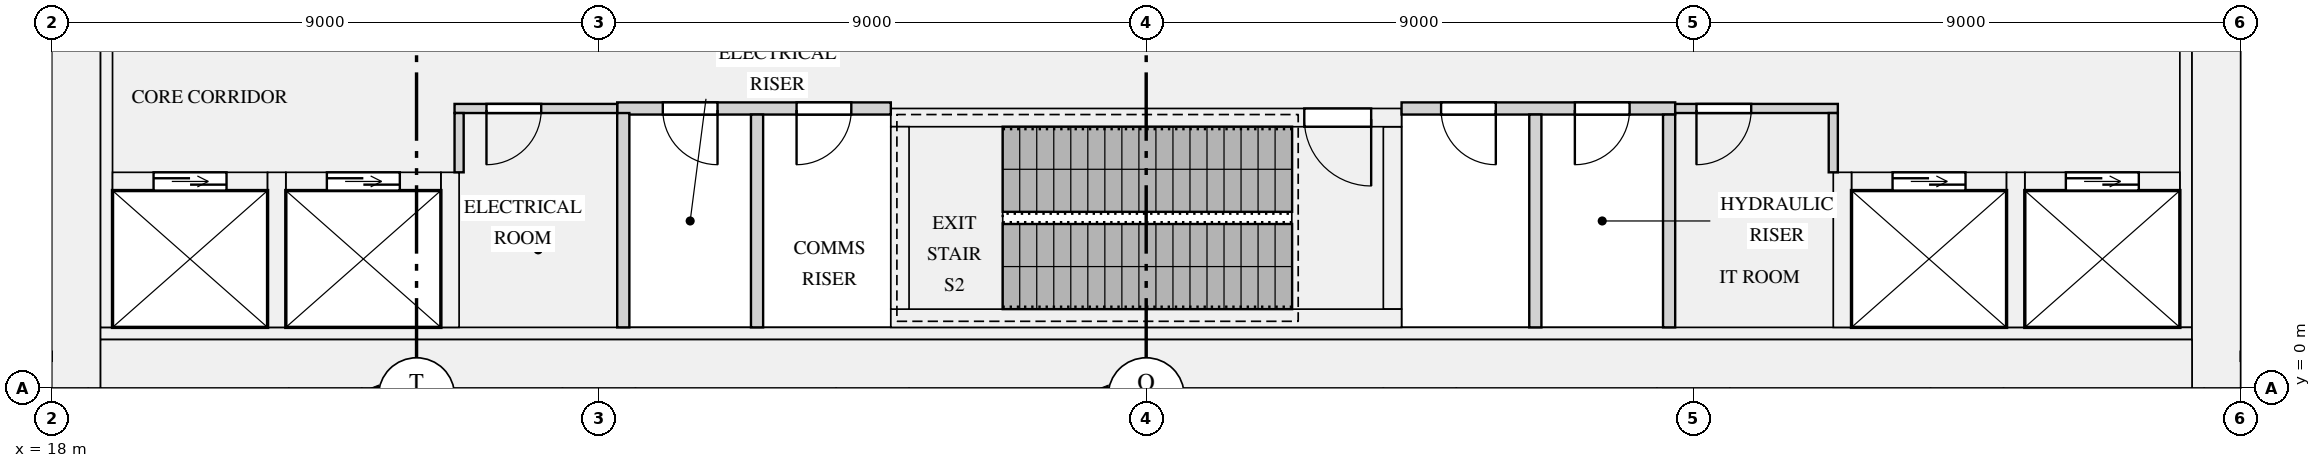
"""IFC4 building model, lengths in metres.
Left out: names, types, materials, properties, quantities, classifications, styles, units other than length and angle.
Written with IfcOpenShell. Run it as: python <this file> out.ifc"""

import sys

from ifc_helpers import new_model, si_unit, direction, frame, frame_2d, origin, place, context, subcontext, project, spatial, rectangle, extrude, element, fill, save


model = new_model("IFC4")
c1 = context("Model", 3, precision=1e-05, world=origin(), true_north=direction((0.0, 1.0)))
c2 = subcontext(c1, "Body", "Model", "MODEL_VIEW")
j1 = project(units=[si_unit("LENGTHUNIT", "METRE"), si_unit("PLANEANGLEUNIT", "RADIAN")], contexts=[c1])
p1 = place(None, origin())
s1 = spatial("IfcSite", under=j1, at=p1, CompositionType="ELEMENT")
p2 = place(p1, origin())
s2 = spatial("IfcBuilding", under=s1, at=p2, CompositionType="ELEMENT")
p3 = place(p2, frame((0.0, 0.0, 77.25)))
s3 = spatial("IfcBuildingStorey", under=s2, at=p3, CompositionType="ELEMENT", Elevation=77.25)
for number, where, z_axis, x_axis in (
    (1, (18.4, 0.0, 0.0), (0.0, 0.0, 1.0), (0.0, 1.0, 0.0)),
    (2, (53.6, 0.0, 0.0), (0.0, 0.0, 1.0), (0.0, 1.0, 0.0)),
):
    element("IfcWall", number, at=place(p3, frame(where, z_axis=z_axis, x_axis=x_axis)), inside=s3, PredefinedType="SHEAR", context=c2, shape_type="SweptSolid", body=[
        extrude(rectangle(XDim=12.5, YDim=0.8, at=frame_2d((6.25, 0.0))), origin(), (0.0, 0.0, 1.0), 6.3),
    ])
p4 = place(p3, frame((18.8, 0.4, 0.0), z_axis=(0.0, 0.0, 1.0), x_axis=(1.0, 0.0, 0.0)))
e3 = element("IfcWall", 3, at=p4, inside=s3, PredefinedType="SHEAR", context=c2, shape_type="SweptSolid", body=[
    extrude(rectangle(XDim=34.4, YDim=0.8, at=frame_2d((17.2, 0.0))), origin(), (0.0, 0.0, 1.0), 6.3),
])
for number, where, z_axis, x_axis in (
    (4, (18.9, 1.0, 0.0), (0.0, 0.0, 1.0), (0.0, 1.0, 0.0)),
    (5, (53.1, 1.0, 0.0), (0.0, 0.0, 1.0), (0.0, 1.0, 0.0)),
):
    element("IfcWall", number, at=place(p3, frame(where, z_axis=z_axis, x_axis=x_axis)), inside=s3, PredefinedType="SHEAR", context=c2, shape_type="SweptSolid", body=[
        extrude(rectangle(XDim=10.9, YDim=0.2, at=frame_2d((5.45, 0.0))), origin(), (0.0, 0.0, 1.0), 6.3),
    ])
p5 = place(p3, frame((18.8, 0.9, 0.0), z_axis=(0.0, 0.0, 1.0), x_axis=(1.0, 0.0, 0.0)))
e6 = element("IfcWall", 6, at=p5, inside=s3, PredefinedType="SHEAR", context=c2, shape_type="SweptSolid", body=[
    extrude(rectangle(XDim=34.4, YDim=0.2, at=frame_2d((17.2, 0.0))), origin(), (0.0, 0.0, 1.0), 6.3),
])
p6 = place(p3, frame((19.0, 3.4, 0.0), z_axis=(0.0, 0.0, 1.0), x_axis=(1.0, 0.0, 0.0)))
e7 = element("IfcWall", 7, at=p6, inside=s3, PredefinedType="SHEAR", context=c2, shape_type="SweptSolid", body=[
    extrude(rectangle(XDim=2.55, YDim=0.3, at=frame_2d((1.275, 0.0))), origin(), (0.0, 0.0, 1.0), 6.3),
])
p7 = place(p6, frame((0.675, 0.0, 0.0)))
e8 = element("IfcOpeningElement", 8, at=p7, cuts=e7, PredefinedType="OPENING", context=c2, shape_type="SweptSolid", body=[
    extrude(rectangle(XDim=1.2, YDim=2.1, at=frame_2d((0.6, 1.05))), frame((0.0, 0.16, 0.0), z_axis=(0.0, -1.0, 0.0), x_axis=(1.0, 0.0, 0.0)), (0.0, 0.0, 1.0), 0.32),
])
p8 = place(p3, frame((21.85, 3.4, 0.0), z_axis=(0.0, 0.0, 1.0), x_axis=(1.0, 0.0, 0.0)))
e9 = element("IfcWall", 9, at=p8, inside=s3, PredefinedType="SHEAR", context=c2, shape_type="SweptSolid", body=[
    extrude(rectangle(XDim=2.55, YDim=0.3, at=frame_2d((1.275, 0.0))), origin(), (0.0, 0.0, 1.0), 6.3),
])
p9 = place(p8, frame((0.675, 0.0, 0.0)))
e10 = element("IfcOpeningElement", 10, at=p9, cuts=e9, PredefinedType="OPENING", context=c2, shape_type="SweptSolid", body=[
    extrude(rectangle(XDim=1.2, YDim=2.1, at=frame_2d((0.6, 1.05))), frame((0.0, 0.16, 0.0), z_axis=(0.0, -1.0, 0.0), x_axis=(1.0, 0.0, 0.0)), (0.0, 0.0, 1.0), 0.32),
])
for number, where, z_axis, x_axis in (
    (11, (21.7, 1.0, 0.0), (0.0, 0.0, 1.0), (0.0, 1.0, 0.0)),
    (12, (24.55, 1.0, 0.0), (0.0, 0.0, 1.0), (0.0, 1.0, 0.0)),
):
    element("IfcWall", number, at=place(p3, frame(where, z_axis=z_axis, x_axis=x_axis)), inside=s3, PredefinedType="SHEAR", context=c2, shape_type="SweptSolid", body=[
        extrude(rectangle(XDim=2.55, YDim=0.3, at=frame_2d((1.275, 0.0))), origin(), (0.0, 0.0, 1.0), 6.3),
    ])
p10 = place(p3, frame((47.6, 3.4, 0.0), z_axis=(0.0, 0.0, 1.0), x_axis=(1.0, 0.0, 0.0)))
e13 = element("IfcWall", 13, at=p10, inside=s3, PredefinedType="SHEAR", context=c2, shape_type="SweptSolid", body=[
    extrude(rectangle(XDim=2.55, YDim=0.3, at=frame_2d((1.275, 0.0))), origin(), (0.0, 0.0, 1.0), 6.3),
])
p11 = place(p10, frame((0.675, 0.0, 0.0)))
e14 = element("IfcOpeningElement", 14, at=p11, cuts=e13, PredefinedType="OPENING", context=c2, shape_type="SweptSolid", body=[
    extrude(rectangle(XDim=1.2, YDim=2.1, at=frame_2d((0.6, 1.05))), frame((0.0, 0.16, 0.0), z_axis=(0.0, -1.0, 0.0), x_axis=(1.0, 0.0, 0.0)), (0.0, 0.0, 1.0), 0.32),
])
p12 = place(p3, frame((47.45, 1.0, 0.0), z_axis=(0.0, 0.0, 1.0), x_axis=(0.0, 1.0, 0.0)))
e15 = element("IfcWall", 15, at=p12, inside=s3, PredefinedType="SHEAR", context=c2, shape_type="SweptSolid", body=[
    extrude(rectangle(XDim=2.55, YDim=0.3, at=frame_2d((1.275, 0.0))), origin(), (0.0, 0.0, 1.0), 6.3),
])
p13 = place(p3, frame((50.45, 3.4, 0.0), z_axis=(0.0, 0.0, 1.0), x_axis=(1.0, 0.0, 0.0)))
e16 = element("IfcWall", 16, at=p13, inside=s3, PredefinedType="SHEAR", context=c2, shape_type="SweptSolid", body=[
    extrude(rectangle(XDim=2.55, YDim=0.3, at=frame_2d((1.275, 0.0))), origin(), (0.0, 0.0, 1.0), 6.3),
])
p14 = place(p13, frame((0.675, 0.0, 0.0)))
e17 = element("IfcOpeningElement", 17, at=p14, cuts=e16, PredefinedType="OPENING", context=c2, shape_type="SweptSolid", body=[
    extrude(rectangle(XDim=1.2, YDim=2.1, at=frame_2d((0.6, 1.05))), frame((0.0, 0.16, 0.0), z_axis=(0.0, -1.0, 0.0), x_axis=(1.0, 0.0, 0.0)), (0.0, 0.0, 1.0), 0.32),
])
p15 = place(p3, frame((50.3, 1.0, 0.0), z_axis=(0.0, 0.0, 1.0), x_axis=(0.0, 1.0, 0.0)))
e18 = element("IfcWall", 18, at=p15, inside=s3, PredefinedType="SHEAR", context=c2, shape_type="SweptSolid", body=[
    extrude(rectangle(XDim=2.55, YDim=0.3, at=frame_2d((1.275, 0.0))), origin(), (0.0, 0.0, 1.0), 6.3),
])
p16 = place(p3, frame((31.8, 1.15, 0.0), z_axis=(0.0, 0.0, 1.0), x_axis=(1.0, 0.0, 0.0)))
e19 = element("IfcWall", 19, at=p16, inside=s3, PredefinedType="SHEAR", context=c2, shape_type="SweptSolid", body=[
    extrude(rectangle(XDim=8.4, YDim=0.3, at=frame_2d((4.2, 0.0))), origin(), (0.0, 0.0, 1.0), 6.3),
])
p17 = place(p3, frame((31.8, 4.45, 0.0), z_axis=(0.0, 0.0, 1.0), x_axis=(1.0, 0.0, 0.0)))
e20 = element("IfcWall", 20, at=p17, inside=s3, PredefinedType="SHEAR", context=c2, shape_type="SweptSolid", body=[
    extrude(rectangle(XDim=8.4, YDim=0.3, at=frame_2d((4.2, 0.0))), origin(), (0.0, 0.0, 1.0), 6.3),
])
p18 = place(p17, frame((6.8, 0.0, 0.0)))
e21 = element("IfcOpeningElement", 21, at=p18, cuts=e20, PredefinedType="OPENING", context=c2, shape_type="SweptSolid", body=[
    extrude(rectangle(XDim=1.1, YDim=2.1, at=frame_2d((0.55, 1.05))), frame((0.0, 0.16, 0.0), z_axis=(0.0, -1.0, 0.0), x_axis=(1.0, 0.0, 0.0)), (0.0, 0.0, 1.0), 0.32),
])
for number, where, z_axis, x_axis in (
    (22, (31.95, 1.3, 0.0), (0.0, 0.0, 1.0), (0.0, 1.0, 0.0)),
    (23, (40.05, 1.3, 0.0), (0.0, 0.0, 1.0), (0.0, 1.0, 0.0)),
):
    element("IfcWall", number, at=place(p3, frame(where, z_axis=z_axis, x_axis=x_axis)), inside=s3, PredefinedType="SHEAR", context=c2, shape_type="SweptSolid", body=[
        extrude(rectangle(XDim=3.0, YDim=0.3, at=frame_2d((1.5, 0.0))), origin(), (0.0, 0.0, 1.0), 6.3),
    ])
p19 = place(p3, frame((27.3, 4.6, 0.0), z_axis=(0.0, 0.0, 1.0), x_axis=(1.0, 0.0, 0.0)))
e24 = element("IfcWall", 24, at=p19, inside=s3, PredefinedType="PARTITIONING", context=c2, shape_type="SweptSolid", body=[
    extrude(rectangle(XDim=4.5, YDim=0.2, at=frame_2d((2.25, 0.0))), origin(), (0.0, 0.0, 1.0), 5.98),
])
p20 = place(p19, frame((0.75, 0.0, 0.0)))
e25 = element("IfcOpeningElement", 25, at=p20, cuts=e24, PredefinedType="OPENING", context=c2, shape_type="SweptSolid", body=[
    extrude(rectangle(XDim=0.9, YDim=2.1, at=frame_2d((0.45, 1.05))), frame((0.0, 0.11, 0.0), z_axis=(0.0, -1.0, 0.0), x_axis=(1.0, 0.0, 0.0)), (0.0, 0.0, 1.0), 0.22),
])
p21 = place(p19, frame((2.95, 0.0, 0.0)))
e26 = element("IfcOpeningElement", 26, at=p21, cuts=e24, PredefinedType="OPENING", context=c2, shape_type="SweptSolid", body=[
    extrude(rectangle(XDim=0.9, YDim=2.1, at=frame_2d((0.45, 1.05))), frame((0.0, 0.11, 0.0), z_axis=(0.0, -1.0, 0.0), x_axis=(1.0, 0.0, 0.0)), (0.0, 0.0, 1.0), 0.22),
])
p22 = place(p3, frame((40.2, 4.6, 0.0), z_axis=(0.0, 0.0, 1.0), x_axis=(1.0, 0.0, 0.0)))
e27 = element("IfcWall", 27, at=p22, inside=s3, PredefinedType="PARTITIONING", context=c2, shape_type="SweptSolid", body=[
    extrude(rectangle(XDim=4.5, YDim=0.2, at=frame_2d((2.25, 0.0))), origin(), (0.0, 0.0, 1.0), 5.98),
])
p23 = place(p22, frame((0.65, 0.0, 0.0)))
e28 = element("IfcOpeningElement", 28, at=p23, cuts=e27, PredefinedType="OPENING", context=c2, shape_type="SweptSolid", body=[
    extrude(rectangle(XDim=0.9, YDim=2.1, at=frame_2d((0.45, 1.05))), frame((0.0, 0.11, 0.0), z_axis=(0.0, -1.0, 0.0), x_axis=(1.0, 0.0, 0.0)), (0.0, 0.0, 1.0), 0.22),
])
p24 = place(p22, frame((2.85, 0.0, 0.0)))
e29 = element("IfcOpeningElement", 29, at=p24, cuts=e27, PredefinedType="OPENING", context=c2, shape_type="SweptSolid", body=[
    extrude(rectangle(XDim=0.9, YDim=2.1, at=frame_2d((0.45, 1.05))), frame((0.0, 0.11, 0.0), z_axis=(0.0, -1.0, 0.0), x_axis=(1.0, 0.0, 0.0)), (0.0, 0.0, 1.0), 0.22),
])
p25 = place(p3, frame((24.625, 4.6, 0.0), z_axis=(0.0, 0.0, 1.0), x_axis=(1.0, 0.0, 0.0)))
e30 = element("IfcWall", 30, at=p25, inside=s3, PredefinedType="PARTITIONING", context=c2, shape_type="SweptSolid", body=[
    extrude(rectangle(XDim=2.675, YDim=0.15, at=frame_2d((1.337, 0.0))), origin(), (0.0, 0.0, 1.0), 5.98),
])
p26 = place(p25, frame((0.525, 0.0, 0.0)))
e31 = element("IfcOpeningElement", 31, at=p26, cuts=e30, PredefinedType="OPENING", context=c2, shape_type="SweptSolid", body=[
    extrude(rectangle(XDim=0.9, YDim=2.1, at=frame_2d((0.45, 1.05))), frame((0.0, 0.085, 0.0), z_axis=(0.0, -1.0, 0.0), x_axis=(1.0, 0.0, 0.0)), (0.0, 0.0, 1.0), 0.17),
])
p27 = place(p3, frame((44.7, 4.6, 0.0), z_axis=(0.0, 0.0, 1.0), x_axis=(1.0, 0.0, 0.0)))
e32 = element("IfcWall", 32, at=p27, inside=s3, PredefinedType="PARTITIONING", context=c2, shape_type="SweptSolid", body=[
    extrude(rectangle(XDim=2.675, YDim=0.15, at=frame_2d((1.337, 0.0))), origin(), (0.0, 0.0, 1.0), 5.98),
])
p28 = place(p27, frame((0.35, 0.0, 0.0)))
e33 = element("IfcOpeningElement", 33, at=p28, cuts=e32, PredefinedType="OPENING", context=c2, shape_type="SweptSolid", body=[
    extrude(rectangle(XDim=0.9, YDim=2.1, at=frame_2d((0.45, 1.05))), frame((0.0, 0.085, 0.0), z_axis=(0.0, -1.0, 0.0), x_axis=(1.0, 0.0, 0.0)), (0.0, 0.0, 1.0), 0.17),
])
p29 = place(p3, frame((27.4, 1.0, 0.0), z_axis=(0.0, 0.0, 1.0), x_axis=(0.0, 1.0, 0.0)))
e34 = element("IfcWall", 34, at=p29, inside=s3, PredefinedType="PARTITIONING", context=c2, shape_type="SweptSolid", body=[
    extrude(rectangle(XDim=3.525, YDim=0.2, at=frame_2d((1.762, 0.0))), origin(), (0.0, 0.0, 1.0), 5.98),
])
for number, where, z_axis, x_axis in (
    (35, (29.6, 1.0, 0.0), (0.0, 0.0, 1.0), (0.0, 1.0, 0.0)),
    (36, (42.4, 1.0, 0.0), (0.0, 0.0, 1.0), (0.0, 1.0, 0.0)),
    (37, (44.6, 1.0, 0.0), (0.0, 0.0, 1.0), (0.0, 1.0, 0.0)),
):
    element("IfcWall", number, at=place(p3, frame(where, z_axis=z_axis, x_axis=x_axis)), inside=s3, PredefinedType="PARTITIONING", context=c2, shape_type="SweptSolid", body=[
        extrude(rectangle(XDim=3.5, YDim=0.2, at=frame_2d((1.75, 0.0))), origin(), (0.0, 0.0, 1.0), 5.98),
    ])
for number, where, z_axis, x_axis in (
    (38, (24.7, 3.55, 0.0), (0.0, 0.0, 1.0), (0.0, 1.0, 0.0)),
    (39, (47.3, 3.55, 0.0), (0.0, 0.0, 1.0), (0.0, 1.0, 0.0)),
):
    element("IfcWall", number, at=place(p3, frame(where, z_axis=z_axis, x_axis=x_axis)), inside=s3, PredefinedType="PARTITIONING", context=c2, shape_type="SweptSolid", body=[
        extrude(rectangle(XDim=0.975, YDim=0.15, at=frame_2d((0.487, 0.0))), origin(), (0.0, 0.0, 1.0), 5.98),
    ])
p30 = place(p7, origin())
e40 = element("IfcDoor", 40, at=p30, inside=s3, OperationType="DOUBLE_DOOR_SLIDING", PredefinedType="DOOR", context=c2, shape_type="SweptSolid", body=[
    extrude(rectangle(XDim=1.2, YDim=2.1, at=frame_2d((0.6, 1.05))), frame((0.0, 0.025, 0.0), z_axis=(0.0, -1.0, 0.0), x_axis=(1.0, 0.0, 0.0)), (0.0, 0.0, 1.0), 0.05),
])
fill(e8, e40)
p31 = place(p9, origin())
e41 = element("IfcDoor", 41, at=p31, inside=s3, OperationType="DOUBLE_DOOR_SLIDING", PredefinedType="DOOR", context=c2, shape_type="SweptSolid", body=[
    extrude(rectangle(XDim=1.2, YDim=2.1, at=frame_2d((0.6, 1.05))), frame((0.0, 0.025, 0.0), z_axis=(0.0, -1.0, 0.0), x_axis=(1.0, 0.0, 0.0)), (0.0, 0.0, 1.0), 0.05),
])
fill(e10, e41)
p32 = place(p11, origin())
e42 = element("IfcDoor", 42, at=p32, inside=s3, OperationType="DOUBLE_DOOR_SLIDING", PredefinedType="DOOR", context=c2, shape_type="SweptSolid", body=[
    extrude(rectangle(XDim=1.2, YDim=2.1, at=frame_2d((0.6, 1.05))), frame((0.0, 0.025, 0.0), z_axis=(0.0, -1.0, 0.0), x_axis=(1.0, 0.0, 0.0)), (0.0, 0.0, 1.0), 0.05),
])
fill(e14, e42)
p33 = place(p14, origin())
e43 = element("IfcDoor", 43, at=p33, inside=s3, OperationType="DOUBLE_DOOR_SLIDING", PredefinedType="DOOR", context=c2, shape_type="SweptSolid", body=[
    extrude(rectangle(XDim=1.2, YDim=2.1, at=frame_2d((0.6, 1.05))), frame((0.0, 0.025, 0.0), z_axis=(0.0, -1.0, 0.0), x_axis=(1.0, 0.0, 0.0)), (0.0, 0.0, 1.0), 0.05),
])
fill(e17, e43)
p34 = place(p18, frame((1.1, 0.0, 0.0), z_axis=(0.0, 0.0, 1.0), x_axis=(-1.0, 0.0, 0.0)))
e44 = element("IfcDoor", 44, at=p34, inside=s3, OperationType="SINGLE_SWING_LEFT", PredefinedType="DOOR", context=c2, shape_type="SweptSolid", body=[
    extrude(rectangle(XDim=1.1, YDim=2.1, at=frame_2d((0.55, 1.05))), frame((0.0, 0.025, 0.0), z_axis=(0.0, -1.0, 0.0), x_axis=(1.0, 0.0, 0.0)), (0.0, 0.0, 1.0), 0.05),
])
fill(e21, e44)
p35 = place(p26, frame((0.9, 0.0, 0.0), z_axis=(0.0, 0.0, 1.0), x_axis=(-1.0, 0.0, 0.0)))
e45 = element("IfcDoor", 45, at=p35, inside=s3, OperationType="SINGLE_SWING_RIGHT", PredefinedType="DOOR", context=c2, shape_type="SweptSolid", body=[
    extrude(rectangle(XDim=0.9, YDim=2.1, at=frame_2d((0.45, 1.05))), frame((0.0, 0.025, 0.0), z_axis=(0.0, -1.0, 0.0), x_axis=(1.0, 0.0, 0.0)), (0.0, 0.0, 1.0), 0.05),
])
fill(e31, e45)
p36 = place(p28, frame((0.9, 0.0, 0.0), z_axis=(0.0, 0.0, 1.0), x_axis=(-1.0, 0.0, 0.0)))
e46 = element("IfcDoor", 46, at=p36, inside=s3, OperationType="SINGLE_SWING_RIGHT", PredefinedType="DOOR", context=c2, shape_type="SweptSolid", body=[
    extrude(rectangle(XDim=0.9, YDim=2.1, at=frame_2d((0.45, 1.05))), frame((0.0, 0.025, 0.0), z_axis=(0.0, -1.0, 0.0), x_axis=(1.0, 0.0, 0.0)), (0.0, 0.0, 1.0), 0.05),
])
fill(e33, e46)
p37 = place(p20, frame((0.9, 0.0, 0.0), z_axis=(0.0, 0.0, 1.0), x_axis=(-1.0, 0.0, 0.0)))
e47 = element("IfcDoor", 47, at=p37, inside=s3, OperationType="SINGLE_SWING_LEFT", PredefinedType="DOOR", context=c2, shape_type="SweptSolid", body=[
    extrude(rectangle(XDim=0.9, YDim=2.1, at=frame_2d((0.45, 1.05))), frame((0.0, 0.025, 0.0), z_axis=(0.0, -1.0, 0.0), x_axis=(1.0, 0.0, 0.0)), (0.0, 0.0, 1.0), 0.05),
])
fill(e25, e47)
p38 = place(p21, frame((0.9, 0.0, 0.0), z_axis=(0.0, 0.0, 1.0), x_axis=(-1.0, 0.0, 0.0)))
e48 = element("IfcDoor", 48, at=p38, inside=s3, OperationType="SINGLE_SWING_RIGHT", PredefinedType="DOOR", context=c2, shape_type="SweptSolid", body=[
    extrude(rectangle(XDim=0.9, YDim=2.1, at=frame_2d((0.45, 1.05))), frame((0.0, 0.025, 0.0), z_axis=(0.0, -1.0, 0.0), x_axis=(1.0, 0.0, 0.0)), (0.0, 0.0, 1.0), 0.05),
])
fill(e26, e48)
p39 = place(p23, frame((0.9, 0.0, 0.0), z_axis=(0.0, 0.0, 1.0), x_axis=(-1.0, 0.0, 0.0)))
e49 = element("IfcDoor", 49, at=p39, inside=s3, OperationType="SINGLE_SWING_LEFT", PredefinedType="DOOR", context=c2, shape_type="SweptSolid", body=[
    extrude(rectangle(XDim=0.9, YDim=2.1, at=frame_2d((0.45, 1.05))), frame((0.0, 0.025, 0.0), z_axis=(0.0, -1.0, 0.0), x_axis=(1.0, 0.0, 0.0)), (0.0, 0.0, 1.0), 0.05),
])
fill(e28, e49)
p40 = place(p24, frame((0.9, 0.0, 0.0), z_axis=(0.0, 0.0, 1.0), x_axis=(-1.0, 0.0, 0.0)))
e50 = element("IfcDoor", 50, at=p40, inside=s3, OperationType="SINGLE_SWING_RIGHT", PredefinedType="DOOR", context=c2, shape_type="SweptSolid", body=[
    extrude(rectangle(XDim=0.9, YDim=2.1, at=frame_2d((0.45, 1.05))), frame((0.0, 0.025, 0.0), z_axis=(0.0, -1.0, 0.0), x_axis=(1.0, 0.0, 0.0)), (0.0, 0.0, 1.0), 0.05),
])
fill(e29, e50)
save(model, sys.argv[1])
